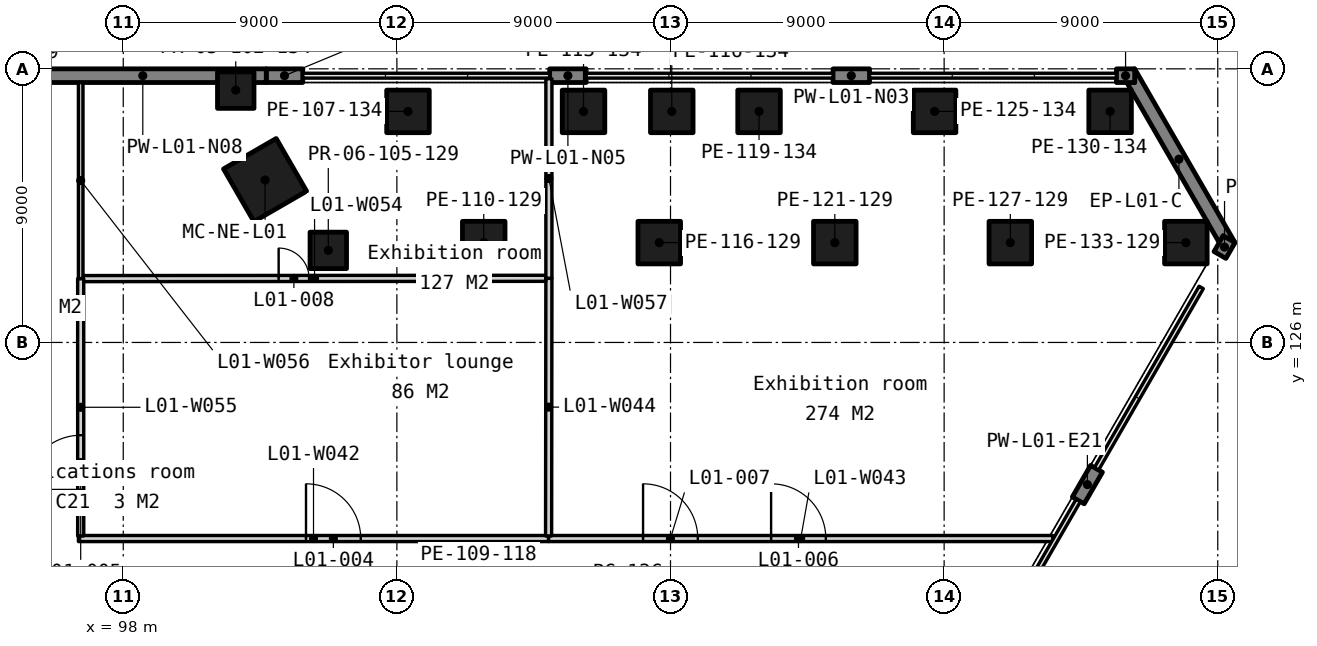
"""IFC4 building model, lengths in metres.
Left out: names, types, materials, properties, quantities, classifications, styles, units other than length and angle.
Written with IfcOpenShell. Run it as: python <this file> out.ifc"""

import sys

from ifc_helpers import new_model, si_unit, direction, frame, frame_2d, origin, origin_2d, place, context, subcontext, project, spatial, polyline, rectangle, outline, extrude, element, fill, save


model = new_model("IFC4")
c1 = context("Model", 3, precision=1e-05, world=origin(), true_north=direction((0.0, 1.0)))
c2 = subcontext(c1, "Body", "Model", "MODEL_VIEW")
j1 = project(units=[si_unit("LENGTHUNIT", "METRE"), si_unit("PLANEANGLEUNIT", "RADIAN")], contexts=[c1])
p1 = place(None, origin())
s1 = spatial("IfcSite", under=j1, at=p1, CompositionType="ELEMENT")
p2 = place(p1, origin())
s2 = spatial("IfcBuilding", under=s1, at=p2, CompositionType="ELEMENT")
p3 = place(p2, frame((0.0, 0.0, 7.5)))
s3 = spatial("IfcBuildingStorey", under=s2, at=p3, CompositionType="ELEMENT", Elevation=7.5)
for number, where, z_axis, x_axis in (
    (1, (107.365, 133.6, 0.0), (0.0, 0.0, 1.0), (1.0, 0.0, 0.0)),
    (2, (109.857, 129.284, 0.0), (0.0, 0.0, 1.0), (1.0, 0.0, 0.0)),
    (3, (113.139, 133.6, 0.0), (0.0, 0.0, 1.0), (1.0, 0.0, 0.0)),
    (4, (115.63, 129.284, 0.0), (0.0, 0.0, 1.0), (1.0, 0.0, 0.0)),
    (5, (116.042, 133.6, 0.0), (0.0, 0.0, 1.0), (1.0, 0.0, 0.0)),
    (6, (118.912, 133.6, 0.0), (0.0, 0.0, 1.0), (1.0, 0.0, 0.0)),
    (7, (121.404, 129.284, 0.0), (0.0, 0.0, 1.0), (1.0, 0.0, 0.0)),
    (8, (124.686, 133.6, 0.0), (0.0, 0.0, 1.0), (1.0, 0.0, 0.0)),
    (9, (127.177, 129.284, 0.0), (0.0, 0.0, 1.0), (1.0, 0.0, 0.0)),
    (10, (130.459, 133.6, 0.0), (0.0, 0.0, 1.0), (1.0, 0.0, 0.0)),
    (11, (132.951, 129.284, 0.0), (0.0, 0.0, 1.0), (1.0, 0.0, 0.0)),
):
    element("IfcColumn", number, at=place(p3, frame(where, z_axis=z_axis, x_axis=x_axis)), inside=s3, PredefinedType="COLUMN", context=c2, shape_type="SweptSolid", body=[
        extrude(rectangle(XDim=1.4, YDim=1.4, at=origin_2d()), origin(), (0.0, 0.0, 1.0), 6.0),
    ])
for number, where, z_axis, x_axis in (
    (12, (101.7, 134.3, 0.0), (0.0, 0.0, 1.0), (1.0, 0.0, 0.0)),
    (13, (104.744, 129.028, 0.0), (0.0, 0.0, 1.0), (1.0, 0.0, 0.0)),
):
    element("IfcColumn", number, at=place(p3, frame(where, z_axis=z_axis, x_axis=x_axis)), inside=s3, PredefinedType="COLUMN", context=c2, shape_type="SweptSolid", body=[
        extrude(rectangle(XDim=1.2, YDim=1.2, at=origin_2d()), origin(), (0.0, 0.0, 1.0), 6.0),
    ])
p4 = place(p3, frame((102.664, 131.342, 0.0), z_axis=(0.0, 0.0, 1.0), x_axis=(-0.5, 0.866025403784, 0.0)))
e14 = element("IfcColumn", 14, at=p4, inside=s3, PredefinedType="COLUMN", context=c2, shape_type="SweptSolid", body=[
    extrude(rectangle(XDim=2.0, YDim=2.0, at=origin_2d()), origin(), (0.0, 0.0, 1.0), 6.0),
])
p5 = place(p3, frame((0.0, 0.0, -0.3)))
e15 = element("IfcWall", 15, at=p5, inside=s3, PredefinedType="SOLIDWALL", context=c2, shape_type="SweptSolid", body=[
    extrude(outline(polyline([(134.568, 129.284), (134.178, 129.509), (134.048, 129.284), (131.008, 134.55), (131.268, 134.55), (131.268, 135.0), (134.568, 129.284)])), origin(), (0.0, 0.0, 1.0), 5.312),
])
p6 = place(p3, frame((131.268, 134.775, -0.3), z_axis=(0.0, 0.0, 1.0), x_axis=(-1.0, 0.0, 0.0)))
e16 = element("IfcWall", 16, at=p6, inside=s3, PredefinedType="SOLIDWALL", context=c2, shape_type="SweptSolid", body=[
    extrude(rectangle(XDim=0.6, YDim=0.45, at=frame_2d((0.3, 0.0))), origin(), (0.0, 0.0, 1.0), 5.312),
])
for number, where, z_axis, x_axis in (
    (17, (122.546, 134.775, -0.3), (0.0, 0.0, 1.0), (-1.0, 0.0, 0.0)),
    (18, (113.225, 134.775, -0.3), (0.0, 0.0, 1.0), (-1.0, 0.0, 0.0)),
    (19, (103.903, 134.775, -0.3), (0.0, 0.0, 1.0), (-1.0, 0.0, 0.0)),
):
    element("IfcWall", number, at=place(p3, frame(where, z_axis=z_axis, x_axis=x_axis)), inside=s3, PredefinedType="SOLIDWALL", context=c2, shape_type="SweptSolid", body=[
        extrude(rectangle(XDim=1.2, YDim=0.45, at=frame_2d((0.6, 0.0))), origin(), (0.0, 0.0, 1.0), 5.312),
    ])
p7 = place(p3, frame((102.703, 134.775, -0.3), z_axis=(0.0, 0.0, 1.0), x_axis=(-1.0, 0.0, 0.0)))
e20 = element("IfcWall", 20, at=p7, inside=s3, PredefinedType="SOLIDWALL", context=c2, shape_type="SweptSolid", body=[
    extrude(rectangle(XDim=8.121, YDim=0.45, at=frame_2d((4.061, 0.0))), origin(), (0.0, 0.0, 1.0), 5.312),
])
p8 = place(p3, frame((129.412, 120.805, -0.3), z_axis=(0.0, 0.0, 1.0), x_axis=(0.50012165622, 0.865955154139, 0.0)))
e21 = element("IfcWall", 21, at=p8, inside=s3, PredefinedType="SOLIDWALL", context=c2, shape_type="SweptSolid", body=[
    extrude(rectangle(XDim=1.2, YDim=0.45, at=frame_2d((0.6, 0.0))), origin(), (0.0, 0.0, 1.0), 5.312),
])
p9 = place(p3, frame((134.073, 128.877, -0.3), z_axis=(0.0, 0.0, 1.0), x_axis=(0.499816412211, 0.866131372301, 0.0)))
e22 = element("IfcWall", 22, at=p9, inside=s3, PredefinedType="SOLIDWALL", context=c2, shape_type="SweptSolid", body=[
    extrude(rectangle(XDim=0.6, YDim=0.45, at=frame_2d((0.3, 0.0))), origin(), (0.0, 0.0, 1.0), 5.312),
])
p10 = place(p3, frame((96.526, 119.55, 0.0), z_axis=(0.0, 0.0, 1.0), x_axis=(1.0, 0.0, 0.0)))
e23 = element("IfcWall", 23, at=p10, inside=s3, PredefinedType="PARTITIONING", context=c2, shape_type="SweptSolid", body=[
    extrude(rectangle(XDim=15.464, YDim=0.2, at=frame_2d((7.732, 0.0))), origin(), (0.0, 0.0, 1.0), 5.7),
])
p11 = place(p10, frame((7.485, 0.0, 0.0)))
e24 = element("IfcOpeningElement", 24, at=p11, cuts=e23, PredefinedType="OPENING", context=c2, shape_type="SweptSolid", body=[
    extrude(rectangle(XDim=1.8, YDim=2.1, at=frame_2d((0.9, 1.05))), frame((0.0, 0.11, 0.0), z_axis=(0.0, -1.0, 0.0), x_axis=(1.0, 0.0, 0.0)), (0.0, 0.0, 1.0), 0.22),
])
p12 = place(p3, frame((111.99, 119.55, 0.0), z_axis=(0.0, 0.0, 1.0), x_axis=(1.0, 0.0, 0.0)))
e25 = element("IfcWall", 25, at=p12, inside=s3, PredefinedType="PARTITIONING", context=c2, shape_type="SweptSolid", body=[
    extrude(rectangle(XDim=16.585, YDim=0.2, at=frame_2d((8.292, 0.0))), origin(), (0.0, 0.0, 1.0), 5.7),
])
p13 = place(p12, frame((7.319, 0.0, 0.0)))
e26 = element("IfcOpeningElement", 26, at=p13, cuts=e25, PredefinedType="OPENING", context=c2, shape_type="SweptSolid", body=[
    extrude(rectangle(XDim=1.8, YDim=2.1, at=frame_2d((0.9, 1.05))), frame((0.0, 0.11, 0.0), z_axis=(0.0, -1.0, 0.0), x_axis=(1.0, 0.0, 0.0)), (0.0, 0.0, 1.0), 0.22),
])
p14 = place(p12, frame((3.107, 0.0, 0.0)))
e27 = element("IfcOpeningElement", 27, at=p14, cuts=e25, PredefinedType="OPENING", context=c2, shape_type="SweptSolid", body=[
    extrude(rectangle(XDim=1.8, YDim=2.1, at=frame_2d((0.9, 1.05))), frame((0.0, 0.11, 0.0), z_axis=(0.0, -1.0, 0.0), x_axis=(1.0, 0.0, 0.0)), (0.0, 0.0, 1.0), 0.22),
])
p15 = place(p3, frame((111.99, 119.635, 0.0), z_axis=(0.0, 0.0, 1.0), x_axis=(0.001181078856, 0.999999302526, 0.0)))
e28 = element("IfcWall", 28, at=p15, inside=s3, PredefinedType="PARTITIONING", context=c2, shape_type="SweptSolid", body=[
    extrude(rectangle(XDim=8.475, YDim=0.2, at=frame_2d((4.238, 0.0))), origin(), (0.0, 0.0, 1.0), 5.7),
])
p16 = place(p3, frame((96.685, 128.1, 0.0), z_axis=(0.0, 0.0, 1.0), x_axis=(0.999999794015, 0.000641848392, 0.0)))
e29 = element("IfcWall", 29, at=p16, inside=s3, PredefinedType="PARTITIONING", context=c2, shape_type="SweptSolid", body=[
    extrude(rectangle(XDim=15.215, YDim=0.2, at=frame_2d((7.607, 0.0))), origin(), (0.0, 0.0, 1.0), 5.7),
])
p17 = place(p16, frame((6.427, 0.0, 0.0)))
e30 = element("IfcOpeningElement", 30, at=p17, cuts=e29, PredefinedType="OPENING", context=c2, shape_type="SweptSolid", body=[
    extrude(rectangle(XDim=1.0, YDim=2.1, at=frame_2d((0.5, 1.05))), frame((0.0, 0.11, 0.0), z_axis=(0.0, -1.0, 0.0), x_axis=(1.0, 0.0, 0.0)), (0.0, 0.0, 1.0), 0.22),
])
p18 = place(p3, frame((96.601, 119.635, 0.0), z_axis=(0.0, 0.0, 1.0), x_axis=(-5.768177e-05, 0.999999998336, 0.0)))
e31 = element("IfcWall", 31, at=p18, inside=s3, PredefinedType="PARTITIONING", context=c2, shape_type="SweptSolid", body=[
    extrude(rectangle(XDim=8.465, YDim=0.2, at=frame_2d((4.232, 0.0))), origin(), (0.0, 0.0, 1.0), 5.7),
])
p19 = place(p18, frame((1.513, 0.0, 0.0)))
e32 = element("IfcOpeningElement", 32, at=p19, cuts=e31, PredefinedType="OPENING", context=c2, shape_type="SweptSolid", body=[
    extrude(rectangle(XDim=1.8, YDim=2.1, at=frame_2d((0.9, 1.05))), frame((0.0, 0.11, 0.0), z_axis=(0.0, -1.0, 0.0), x_axis=(1.0, 0.0, 0.0)), (0.0, 0.0, 1.0), 0.22),
])
p20 = place(p3, frame((96.6, 128.1, 0.0), z_axis=(0.0, 0.0, 1.0), x_axis=(0.0, 1.0, 0.0)))
e33 = element("IfcWall", 33, at=p20, inside=s3, PredefinedType="PARTITIONING", context=c2, shape_type="SweptSolid", body=[
    extrude(rectangle(XDim=6.45, YDim=0.15, at=frame_2d((3.225, 0.0))), origin(), (0.0, 0.0, 1.0), 5.7),
])
p21 = place(p3, frame((112.0, 128.11, 0.0), z_axis=(0.0, 0.0, 1.0), x_axis=(0.0, 1.0, 0.0)))
e34 = element("IfcWall", 34, at=p21, inside=s3, PredefinedType="PARTITIONING", context=c2, shape_type="SweptSolid", body=[
    extrude(rectangle(XDim=6.565, YDim=0.2, at=frame_2d((3.282, 0.0))), origin(), (0.0, 0.0, 1.0), 5.7),
])
p22 = place(p11, origin())
e35 = element("IfcDoor", 35, at=p22, inside=s3, OperationType="SINGLE_SWING_LEFT", PredefinedType="DOOR", context=c2, shape_type="SweptSolid", body=[
    extrude(rectangle(XDim=1.8, YDim=2.1, at=frame_2d((0.9, 1.05))), frame((0.0, 0.025, 0.0), z_axis=(0.0, -1.0, 0.0), x_axis=(1.0, 0.0, 0.0)), (0.0, 0.0, 1.0), 0.05),
])
fill(e24, e35)
p23 = place(p19, origin())
e36 = element("IfcDoor", 36, at=p23, inside=s3, OperationType="SINGLE_SWING_LEFT", PredefinedType="DOOR", context=c2, shape_type="SweptSolid", body=[
    extrude(rectangle(XDim=1.8, YDim=2.1, at=frame_2d((0.9, 1.05))), frame((0.0, 0.025, 0.0), z_axis=(0.0, -1.0, 0.0), x_axis=(1.0, 0.0, 0.0)), (0.0, 0.0, 1.0), 0.05),
])
fill(e32, e36)
p24 = place(p13, origin())
e37 = element("IfcDoor", 37, at=p24, inside=s3, OperationType="SINGLE_SWING_LEFT", PredefinedType="DOOR", context=c2, shape_type="SweptSolid", body=[
    extrude(rectangle(XDim=1.8, YDim=2.1, at=frame_2d((0.9, 1.05))), frame((0.0, 0.025, 0.0), z_axis=(0.0, -1.0, 0.0), x_axis=(1.0, 0.0, 0.0)), (0.0, 0.0, 1.0), 0.05),
])
fill(e26, e37)
p25 = place(p14, origin())
e38 = element("IfcDoor", 38, at=p25, inside=s3, OperationType="SINGLE_SWING_LEFT", PredefinedType="DOOR", context=c2, shape_type="SweptSolid", body=[
    extrude(rectangle(XDim=1.8, YDim=2.1, at=frame_2d((0.9, 1.05))), frame((0.0, 0.025, 0.0), z_axis=(0.0, -1.0, 0.0), x_axis=(1.0, 0.0, 0.0)), (0.0, 0.0, 1.0), 0.05),
])
fill(e27, e38)
p26 = place(p17, origin())
e39 = element("IfcDoor", 39, at=p26, inside=s3, OperationType="SINGLE_SWING_LEFT", PredefinedType="DOOR", context=c2, shape_type="SweptSolid", body=[
    extrude(rectangle(XDim=1.0, YDim=2.1, at=frame_2d((0.5, 1.05))), frame((0.0, 0.025, 0.0), z_axis=(0.0, -1.0, 0.0), x_axis=(1.0, 0.0, 0.0)), (0.0, 0.0, 1.0), 0.05),
])
fill(e30, e39)
save(model, sys.argv[1])
